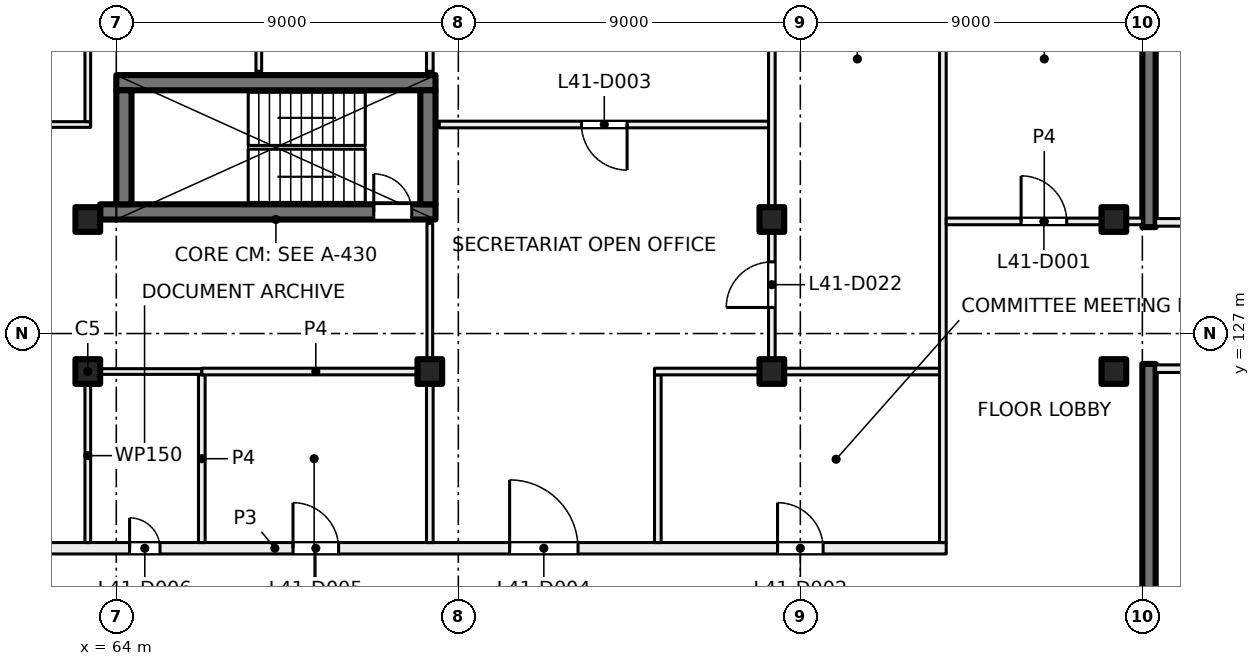
"""IFC4 building model, lengths in metres.
Left out: names, types, materials, properties, quantities, classifications, styles, units other than length and angle.
Written with IfcOpenShell. Run it as: python <this file> out.ifc"""

import sys

from ifc_helpers import new_model, si_unit, direction, frame, frame_2d, origin, origin_2d, place, context, subcontext, project, spatial, rectangle, extrude, element, fill, save


model = new_model("IFC4")
c1 = context("Model", 3, precision=1e-05, world=origin(), true_north=direction((0.0, 1.0)))
c2 = subcontext(c1, "Body", "Model", "MODEL_VIEW")
j1 = project(units=[si_unit("LENGTHUNIT", "METRE"), si_unit("PLANEANGLEUNIT", "RADIAN")], contexts=[c1])
p1 = place(None, origin())
s1 = spatial("IfcSite", under=j1, at=p1, CompositionType="ELEMENT")
p2 = place(p1, origin())
s2 = spatial("IfcBuilding", under=s1, at=p2, CompositionType="ELEMENT")
p3 = place(p2, frame((0.0, 0.0, 174.5)))
s3 = spatial("IfcBuildingStorey", under=s2, at=p3, CompositionType="ELEMENT", Elevation=174.5)
for number, where, z_axis, x_axis in (
    (1, (63.25, 130.0, 0.0), (0.0, 0.0, 1.0), (1.0, 0.0, 0.0)),
    (2, (81.25, 130.0, 0.0), (0.0, 0.0, 1.0), (1.0, 0.0, 0.0)),
    (3, (90.25, 130.0, 0.0), (0.0, 0.0, 1.0), (1.0, 0.0, 0.0)),
    (4, (63.25, 126.0, 0.0), (0.0, 0.0, 1.0), (1.0, 0.0, 0.0)),
    (5, (72.25, 126.0, 0.0), (0.0, 0.0, 1.0), (1.0, 0.0, 0.0)),
    (6, (81.25, 126.0, 0.0), (0.0, 0.0, 1.0), (1.0, 0.0, 0.0)),
    (7, (90.25, 126.0, 0.0), (0.0, 0.0, 1.0), (1.0, 0.0, 0.0)),
):
    element("IfcColumn", number, at=place(p3, frame(where, z_axis=z_axis, x_axis=x_axis)), inside=s3, PredefinedType="COLUMN", context=c2, shape_type="SweptSolid", body=[
        extrude(rectangle(XDim=0.65, YDim=0.65, at=origin_2d()), origin(), (0.0, 0.0, 1.0), 4.0),
    ])
for number, where, z_axis, x_axis in (
    (8, (91.175, 138.45, 0.0), (0.0, 0.0, 1.0), (0.0, -1.0, 0.0)),
    (9, (91.175, 126.2, 0.0), (0.0, 0.0, 1.0), (0.0, -1.0, 0.0)),
):
    element("IfcWall", number, at=place(p3, frame(where, z_axis=z_axis, x_axis=x_axis)), inside=s3, PredefinedType="SHEAR", context=c2, shape_type="SweptSolid", body=[
        extrude(rectangle(XDim=8.65, YDim=0.35, at=frame_2d((4.325, 0.0))), origin(), (0.0, 0.0, 1.0), 4.0),
    ])
p4 = place(p3, frame((63.575, 130.2, 0.0), z_axis=(0.0, 0.0, 1.0), x_axis=(1.0, 0.0, 0.0)))
e10 = element("IfcWall", 10, at=p4, inside=s3, PredefinedType="SHEAR", context=c2, shape_type="SweptSolid", body=[
    extrude(rectangle(XDim=8.825, YDim=0.4, at=frame_2d((4.413, 0.0))), origin(), (0.0, 0.0, 1.0), 4.0),
])
p5 = place(p4, frame((7.2, 0.0, 0.0)))
e11 = element("IfcOpeningElement", 11, at=p5, cuts=e10, PredefinedType="OPENING", context=c2, shape_type="SweptSolid", body=[
    extrude(rectangle(XDim=1.0, YDim=2.1, at=frame_2d((0.5, 1.05))), frame((0.0, 0.21, 0.0), z_axis=(0.0, -1.0, 0.0), x_axis=(1.0, 0.0, 0.0)), (0.0, 0.0, 1.0), 0.42),
])
p6 = place(p3, frame((64.0, 133.6, 0.0), z_axis=(0.0, 0.0, 1.0), x_axis=(1.0, 0.0, 0.0)))
e12 = element("IfcWall", 12, at=p6, inside=s3, PredefinedType="SHEAR", context=c2, shape_type="SweptSolid", body=[
    extrude(rectangle(XDim=8.4, YDim=0.4, at=frame_2d((4.2, 0.0))), origin(), (0.0, 0.0, 1.0), 4.0),
])
for number, where, z_axis, x_axis in (
    (13, (64.2, 130.4, 0.0), (0.0, 0.0, 1.0), (0.0, 1.0, 0.0)),
    (14, (72.2, 130.4, 0.0), (0.0, 0.0, 1.0), (0.0, 1.0, 0.0)),
):
    element("IfcWall", number, at=place(p3, frame(where, z_axis=z_axis, x_axis=x_axis)), inside=s3, PredefinedType="SHEAR", context=c2, shape_type="SweptSolid", body=[
        extrude(rectangle(XDim=3.0, YDim=0.4, at=frame_2d((1.5, 0.0))), origin(), (0.0, 0.0, 1.0), 4.0),
    ])
p7 = place(p3, frame((95.225, 126.075, 0.0), z_axis=(0.0, 0.0, 1.0), x_axis=(-1.0, 0.0, 0.0)))
e15 = element("IfcWall", 15, at=p7, inside=s3, PredefinedType="PARTITIONING", context=c2, shape_type="SweptSolid", body=[
    extrude(rectangle(XDim=3.875, YDim=0.2, at=frame_2d((1.938, 0.0))), origin(), (0.0, 0.0, 1.0), 3.625),
])
p8 = place(p7, frame((0.3, 0.0, 0.0)))
e16 = element("IfcOpeningElement", 16, at=p8, cuts=e15, PredefinedType="OPENING", context=c2, shape_type="SweptSolid", body=[
    extrude(rectangle(XDim=1.2, YDim=2.1, at=frame_2d((0.6, 1.05))), frame((0.0, 0.11, 0.0), z_axis=(0.0, -1.0, 0.0), x_axis=(1.0, 0.0, 0.0)), (0.0, 0.0, 1.0), 0.22),
])
p9 = place(p3, frame((91.35, 129.925, 0.0), z_axis=(0.0, 0.0, 1.0), x_axis=(1.0, 0.0, 0.0)))
e17 = element("IfcWall", 17, at=p9, inside=s3, PredefinedType="PARTITIONING", context=c2, shape_type="SweptSolid", body=[
    extrude(rectangle(XDim=3.875, YDim=0.2, at=frame_2d((1.938, 0.0))), origin(), (0.0, 0.0, 1.0), 3.625),
])
p10 = place(p9, frame((2.375, 0.0, 0.0)))
e18 = element("IfcOpeningElement", 18, at=p10, cuts=e17, PredefinedType="OPENING", context=c2, shape_type="SweptSolid", body=[
    extrude(rectangle(XDim=1.2, YDim=2.1, at=frame_2d((0.6, 1.05))), frame((0.0, 0.11, 0.0), z_axis=(0.0, -1.0, 0.0), x_axis=(1.0, 0.0, 0.0)), (0.0, 0.0, 1.0), 0.22),
])
p11 = place(p3, frame((50.506, 121.35, 0.0), z_axis=(0.0, 0.0, 1.0), x_axis=(1.0, 0.0, 0.0)))
e19 = element("IfcWall", 19, at=p11, inside=s3, PredefinedType="PARTITIONING", context=c2, shape_type="SweptSolid", body=[
    extrude(rectangle(XDim=35.332, YDim=0.3, at=frame_2d((17.666, 0.0))), origin(), (0.0, 0.0, 1.0), 3.625),
])
p12 = place(p11, frame((30.894, 0.0, 0.0)))
e20 = element("IfcOpeningElement", 20, at=p12, cuts=e19, PredefinedType="OPENING", context=c2, shape_type="SweptSolid", body=[
    extrude(rectangle(XDim=1.2, YDim=2.1, at=frame_2d((0.6, 1.05))), frame((0.0, 0.16, 0.0), z_axis=(0.0, -1.0, 0.0), x_axis=(1.0, 0.0, 0.0)), (0.0, 0.0, 1.0), 0.32),
])
p13 = place(p11, frame((23.844, 0.0, 0.0)))
e21 = element("IfcOpeningElement", 21, at=p13, cuts=e19, PredefinedType="OPENING", context=c2, shape_type="SweptSolid", body=[
    extrude(rectangle(XDim=1.8, YDim=2.1, at=frame_2d((0.9, 1.05))), frame((0.0, 0.16, 0.0), z_axis=(0.0, -1.0, 0.0), x_axis=(1.0, 0.0, 0.0)), (0.0, 0.0, 1.0), 0.32),
])
p14 = place(p11, frame((18.144, 0.0, 0.0)))
e22 = element("IfcOpeningElement", 22, at=p14, cuts=e19, PredefinedType="OPENING", context=c2, shape_type="SweptSolid", body=[
    extrude(rectangle(XDim=1.2, YDim=2.1, at=frame_2d((0.6, 1.05))), frame((0.0, 0.16, 0.0), z_axis=(0.0, -1.0, 0.0), x_axis=(1.0, 0.0, 0.0)), (0.0, 0.0, 1.0), 0.32),
])
p15 = place(p11, frame((13.844, 0.0, 0.0)))
e23 = element("IfcOpeningElement", 23, at=p15, cuts=e19, PredefinedType="OPENING", context=c2, shape_type="SweptSolid", body=[
    extrude(rectangle(XDim=0.8, YDim=2.1, at=frame_2d((0.4, 1.05))), frame((0.0, 0.16, 0.0), z_axis=(0.0, -1.0, 0.0), x_axis=(1.0, 0.0, 0.0)), (0.0, 0.0, 1.0), 0.32),
])
p16 = place(p11, frame((7.344, 0.0, 0.0)))
e24 = element("IfcOpeningElement", 24, at=p16, cuts=e19, PredefinedType="OPENING", context=c2, shape_type="SweptSolid", body=[
    extrude(rectangle(XDim=1.8, YDim=2.1, at=frame_2d((0.9, 1.05))), frame((0.0, 0.16, 0.0), z_axis=(0.0, -1.0, 0.0), x_axis=(1.0, 0.0, 0.0)), (0.0, 0.0, 1.0), 0.32),
])
p17 = place(p11, frame((1.047, 0.0, 0.0)))
e25 = element("IfcOpeningElement", 25, at=p17, cuts=e19, PredefinedType="OPENING", context=c2, shape_type="SweptSolid", body=[
    extrude(rectangle(XDim=1.8, YDim=2.1, at=frame_2d((0.9, 1.05))), frame((0.0, 0.16, 0.0), z_axis=(0.0, -1.0, 0.0), x_axis=(1.0, 0.0, 0.0)), (0.0, 0.0, 1.0), 0.32),
])
p18 = place(p3, frame((63.325, 132.5, 0.0), z_axis=(0.0, 0.0, 1.0), x_axis=(-1.0, 0.0, 0.0)))
e26 = element("IfcWall", 26, at=p18, inside=s3, PredefinedType="PARTITIONING", context=c2, shape_type="SweptSolid", body=[
    extrude(rectangle(XDim=9.0, YDim=0.15, at=frame_2d((4.5, 0.0))), origin(), (0.0, 0.0, 1.0), 3.625),
])
p19 = place(p18, frame((6.298, 0.0, 0.0)))
e27 = element("IfcOpeningElement", 27, at=p19, cuts=e26, PredefinedType="OPENING", context=c2, shape_type="SweptSolid", body=[
    extrude(rectangle(XDim=1.0, YDim=2.1, at=frame_2d((0.5, 1.05))), frame((0.0, 0.085, 0.0), z_axis=(0.0, -1.0, 0.0), x_axis=(1.0, 0.0, 0.0)), (0.0, 0.0, 1.0), 0.17),
])
p20 = place(p3, frame((63.25, 126.075, 0.0), z_axis=(0.0, 0.0, 1.0), x_axis=(0.0, -1.0, 0.0)))
e28 = element("IfcWall", 28, at=p20, inside=s3, PredefinedType="PARTITIONING", context=c2, shape_type="SweptSolid", body=[
    extrude(rectangle(XDim=4.575, YDim=0.15, at=frame_2d((2.288, 0.0))), origin(), (0.0, 0.0, 1.0), 3.625),
])
p21 = place(p3, frame((63.25, 138.4, 0.0), z_axis=(0.0, 0.0, 1.0), x_axis=(0.0, -1.0, 0.0)))
e29 = element("IfcWall", 29, at=p21, inside=s3, PredefinedType="PARTITIONING", context=c2, shape_type="SweptSolid", body=[
    extrude(rectangle(XDim=5.825, YDim=0.15, at=frame_2d((2.913, 0.0))), origin(), (0.0, 0.0, 1.0), 3.625),
])
p22 = place(p21, frame((2.423, 0.0, 0.0)))
e30 = element("IfcOpeningElement", 30, at=p22, cuts=e29, PredefinedType="OPENING", context=c2, shape_type="SweptSolid", body=[
    extrude(rectangle(XDim=1.0, YDim=2.1, at=frame_2d((0.5, 1.05))), frame((0.0, 0.085, 0.0), z_axis=(0.0, -1.0, 0.0), x_axis=(1.0, 0.0, 0.0)), (0.0, 0.0, 1.0), 0.17),
])
p23 = place(p3, frame((66.25, 121.5, 0.0), z_axis=(0.0, 0.0, 1.0), x_axis=(0.0, 1.0, 0.0)))
e31 = element("IfcWall", 31, at=p23, inside=s3, PredefinedType="PARTITIONING", context=c2, shape_type="SweptSolid", body=[
    extrude(rectangle(XDim=4.412, YDim=0.175, at=frame_2d((2.206, 0.0))), origin(), (0.0, 0.0, 1.0), 3.625),
])
p24 = place(p3, frame((66.25, 126.0, 0.0), z_axis=(0.0, 0.0, 1.0), x_axis=(-1.0, 0.0, 0.0)))
e32 = element("IfcWall", 32, at=p24, inside=s3, PredefinedType="PARTITIONING", context=c2, shape_type="SweptSolid", body=[
    extrude(rectangle(XDim=2.925, YDim=0.15, at=frame_2d((1.462, 0.0))), origin(), (0.0, 0.0, 1.0), 3.625),
])
p25 = place(p3, frame((66.25, 126.0, 0.0), z_axis=(0.0, 0.0, 1.0), x_axis=(1.0, 0.0, 0.0)))
e33 = element("IfcWall", 33, at=p25, inside=s3, PredefinedType="PARTITIONING", context=c2, shape_type="SweptSolid", body=[
    extrude(rectangle(XDim=6.0, YDim=0.175, at=frame_2d((3.0, 0.0))), origin(), (0.0, 0.0, 1.0), 3.625),
])
p26 = place(p3, frame((67.75, 133.9, 0.0), z_axis=(0.0, 0.0, 1.0), x_axis=(0.0, 1.0, 0.0)))
e34 = element("IfcWall", 34, at=p26, inside=s3, PredefinedType="PARTITIONING", context=c2, shape_type="SweptSolid", body=[
    extrude(rectangle(XDim=4.5, YDim=0.15, at=frame_2d((2.25, 0.0))), origin(), (0.0, 0.0, 1.0), 3.625),
])
p27 = place(p26, frame((1.75, 0.0, 0.0)))
e35 = element("IfcOpeningElement", 35, at=p27, cuts=e34, PredefinedType="OPENING", context=c2, shape_type="SweptSolid", body=[
    extrude(rectangle(XDim=1.0, YDim=2.1, at=frame_2d((0.5, 1.05))), frame((0.0, 0.085, 0.0), z_axis=(0.0, -1.0, 0.0), x_axis=(1.0, 0.0, 0.0)), (0.0, 0.0, 1.0), 0.17),
])
p28 = place(p3, frame((72.25, 121.5, 0.0), z_axis=(0.0, 0.0, 1.0), x_axis=(0.0, 1.0, 0.0)))
e36 = element("IfcWall", 36, at=p28, inside=s3, PredefinedType="PARTITIONING", context=c2, shape_type="SweptSolid", body=[
    extrude(rectangle(XDim=4.428, YDim=0.175, at=frame_2d((2.214, 0.0))), origin(), (0.0, 0.0, 1.0), 3.625),
])
p29 = place(p3, frame((72.25, 126.084, 0.0), z_axis=(0.0, 0.0, 1.0), x_axis=(0.0, 1.0, 0.0)))
e37 = element("IfcWall", 37, at=p29, inside=s3, PredefinedType="PARTITIONING", context=c2, shape_type="SweptSolid", body=[
    extrude(rectangle(XDim=3.816, YDim=0.15, at=frame_2d((1.908, 0.0))), origin(), (0.0, 0.0, 1.0), 3.625),
])
p30 = place(p3, frame((72.25, 133.9, 0.0), z_axis=(0.0, 0.0, 1.0), x_axis=(0.0, 1.0, 0.0)))
e38 = element("IfcWall", 38, at=p30, inside=s3, PredefinedType="PARTITIONING", context=c2, shape_type="SweptSolid", body=[
    extrude(rectangle(XDim=4.5, YDim=0.175, at=frame_2d((2.25, 0.0))), origin(), (0.0, 0.0, 1.0), 3.625),
])
p31 = place(p3, frame((78.25, 125.912, 0.0), z_axis=(0.0, 0.0, 1.0), x_axis=(0.0, -1.0, 0.0)))
e39 = element("IfcWall", 39, at=p31, inside=s3, PredefinedType="PARTITIONING", context=c2, shape_type="SweptSolid", body=[
    extrude(rectangle(XDim=4.412, YDim=0.175, at=frame_2d((2.206, 0.0))), origin(), (0.0, 0.0, 1.0), 3.625),
])
p32 = place(p3, frame((78.162, 126.0, 0.0), z_axis=(0.0, 0.0, 1.0), x_axis=(1.0, 0.0, 0.0)))
e40 = element("IfcWall", 40, at=p32, inside=s3, PredefinedType="PARTITIONING", context=c2, shape_type="SweptSolid", body=[
    extrude(rectangle(XDim=7.5, YDim=0.175, at=frame_2d((3.75, 0.0))), origin(), (0.0, 0.0, 1.0), 3.625),
])
p33 = place(p3, frame((81.25, 126.088, 0.0), z_axis=(0.0, 0.0, 1.0), x_axis=(0.0, 1.0, 0.0)))
e41 = element("IfcWall", 41, at=p33, inside=s3, PredefinedType="PARTITIONING", context=c2, shape_type="SweptSolid", body=[
    extrude(rectangle(XDim=12.312, YDim=0.175, at=frame_2d((6.156, 0.0))), origin(), (0.0, 0.0, 1.0), 3.625),
])
p34 = place(p33, frame((1.597, 0.0, 0.0)))
e42 = element("IfcOpeningElement", 42, at=p34, cuts=e41, PredefinedType="OPENING", context=c2, shape_type="SweptSolid", body=[
    extrude(rectangle(XDim=1.2, YDim=2.1, at=frame_2d((0.6, 1.05))), frame((0.0, 0.097, 0.0), z_axis=(0.0, -1.0, 0.0), x_axis=(1.0, 0.0, 0.0)), (0.0, 0.0, 1.0), 0.195),
])
p35 = place(p3, frame((81.162, 132.5, 0.0), z_axis=(0.0, 0.0, 1.0), x_axis=(-1.0, 0.0, 0.0)))
e43 = element("IfcWall", 43, at=p35, inside=s3, PredefinedType="PARTITIONING", context=c2, shape_type="SweptSolid", body=[
    extrude(rectangle(XDim=8.662, YDim=0.175, at=frame_2d((4.331, 0.0))), origin(), (0.0, 0.0, 1.0), 3.625),
])
p36 = place(p35, frame((3.721, 0.0, 0.0)))
e44 = element("IfcOpeningElement", 44, at=p36, cuts=e43, PredefinedType="OPENING", context=c2, shape_type="SweptSolid", body=[
    extrude(rectangle(XDim=1.2, YDim=2.1, at=frame_2d((0.6, 1.05))), frame((0.0, 0.097, 0.0), z_axis=(0.0, -1.0, 0.0), x_axis=(1.0, 0.0, 0.0)), (0.0, 0.0, 1.0), 0.195),
])
p37 = place(p3, frame((85.75, 121.5, 0.0), z_axis=(0.0, 0.0, 1.0), x_axis=(0.0, 1.0, 0.0)))
e45 = element("IfcWall", 45, at=p37, inside=s3, PredefinedType="PARTITIONING", context=c2, shape_type="SweptSolid", body=[
    extrude(rectangle(XDim=16.9, YDim=0.175, at=frame_2d((8.45, 0.0))), origin(), (0.0, 0.0, 1.0), 3.625),
])
p38 = place(p3, frame((85.838, 129.95, 0.0), z_axis=(0.0, 0.0, 1.0), x_axis=(1.0, 0.0, 0.0)))
e46 = element("IfcWall", 46, at=p38, inside=s3, PredefinedType="PARTITIONING", context=c2, shape_type="SweptSolid", body=[
    extrude(rectangle(XDim=5.162, YDim=0.175, at=frame_2d((2.581, 0.0))), origin(), (0.0, 0.0, 1.0), 3.625),
])
p39 = place(p38, frame((1.971, 0.0, 0.0)))
e47 = element("IfcOpeningElement", 47, at=p39, cuts=e46, PredefinedType="OPENING", context=c2, shape_type="SweptSolid", body=[
    extrude(rectangle(XDim=1.2, YDim=2.1, at=frame_2d((0.6, 1.05))), frame((0.0, 0.097, 0.0), z_axis=(0.0, -1.0, 0.0), x_axis=(1.0, 0.0, 0.0)), (0.0, 0.0, 1.0), 0.195),
])
p40 = place(p5, origin())
e48 = element("IfcDoor", 48, at=p40, inside=s3, OperationType="SINGLE_SWING_LEFT", PredefinedType="DOOR", context=c2, shape_type="SweptSolid", body=[
    extrude(rectangle(XDim=1.0, YDim=2.1, at=frame_2d((0.5, 1.05))), frame((0.0, 0.025, 0.0), z_axis=(0.0, -1.0, 0.0), x_axis=(1.0, 0.0, 0.0)), (0.0, 0.0, 1.0), 0.05),
])
fill(e11, e48)
p41 = place(p39, origin())
e49 = element("IfcDoor", 49, at=p41, inside=s3, OperationType="DOUBLE_DOOR_SINGLE_SWING", PredefinedType="DOOR", context=c2, shape_type="SweptSolid", body=[
    extrude(rectangle(XDim=1.2, YDim=2.1, at=frame_2d((0.6, 1.05))), frame((0.0, 0.025, 0.0), z_axis=(0.0, -1.0, 0.0), x_axis=(1.0, 0.0, 0.0)), (0.0, 0.0, 1.0), 0.05),
])
fill(e47, e49)
p42 = place(p12, origin())
e50 = element("IfcDoor", 50, at=p42, inside=s3, OperationType="DOUBLE_DOOR_SINGLE_SWING", PredefinedType="DOOR", context=c2, shape_type="SweptSolid", body=[
    extrude(rectangle(XDim=1.2, YDim=2.1, at=frame_2d((0.6, 1.05))), frame((0.0, 0.025, 0.0), z_axis=(0.0, -1.0, 0.0), x_axis=(1.0, 0.0, 0.0)), (0.0, 0.0, 1.0), 0.05),
])
fill(e20, e50)
p43 = place(p36, origin())
e51 = element("IfcDoor", 51, at=p43, inside=s3, OperationType="DOUBLE_DOOR_SINGLE_SWING", PredefinedType="DOOR", context=c2, shape_type="SweptSolid", body=[
    extrude(rectangle(XDim=1.2, YDim=2.1, at=frame_2d((0.6, 1.05))), frame((0.0, 0.025, 0.0), z_axis=(0.0, -1.0, 0.0), x_axis=(1.0, 0.0, 0.0)), (0.0, 0.0, 1.0), 0.05),
])
fill(e44, e51)
p44 = place(p13, origin())
e52 = element("IfcDoor", 52, at=p44, inside=s3, OperationType="DOUBLE_DOOR_SINGLE_SWING", PredefinedType="DOOR", context=c2, shape_type="SweptSolid", body=[
    extrude(rectangle(XDim=1.8, YDim=2.1, at=frame_2d((0.9, 1.05))), frame((0.0, 0.025, 0.0), z_axis=(0.0, -1.0, 0.0), x_axis=(1.0, 0.0, 0.0)), (0.0, 0.0, 1.0), 0.05),
])
fill(e21, e52)
p45 = place(p14, origin())
e53 = element("IfcDoor", 53, at=p45, inside=s3, OperationType="DOUBLE_DOOR_SINGLE_SWING", PredefinedType="DOOR", context=c2, shape_type="SweptSolid", body=[
    extrude(rectangle(XDim=1.2, YDim=2.1, at=frame_2d((0.6, 1.05))), frame((0.0, 0.025, 0.0), z_axis=(0.0, -1.0, 0.0), x_axis=(1.0, 0.0, 0.0)), (0.0, 0.0, 1.0), 0.05),
])
fill(e22, e53)
p46 = place(p15, origin())
e54 = element("IfcDoor", 54, at=p46, inside=s3, OperationType="SINGLE_SWING_LEFT", PredefinedType="DOOR", context=c2, shape_type="SweptSolid", body=[
    extrude(rectangle(XDim=0.8, YDim=2.1, at=frame_2d((0.4, 1.05))), frame((0.0, 0.025, 0.0), z_axis=(0.0, -1.0, 0.0), x_axis=(1.0, 0.0, 0.0)), (0.0, 0.0, 1.0), 0.05),
])
fill(e23, e54)
p47 = place(p34, origin())
e55 = element("IfcDoor", 55, at=p47, inside=s3, OperationType="DOUBLE_DOOR_SINGLE_SWING", PredefinedType="DOOR", context=c2, shape_type="SweptSolid", body=[
    extrude(rectangle(XDim=1.2, YDim=2.1, at=frame_2d((0.6, 1.05))), frame((0.0, 0.025, 0.0), z_axis=(0.0, -1.0, 0.0), x_axis=(1.0, 0.0, 0.0)), (0.0, 0.0, 1.0), 0.05),
])
fill(e42, e55)
save(model, sys.argv[1])
